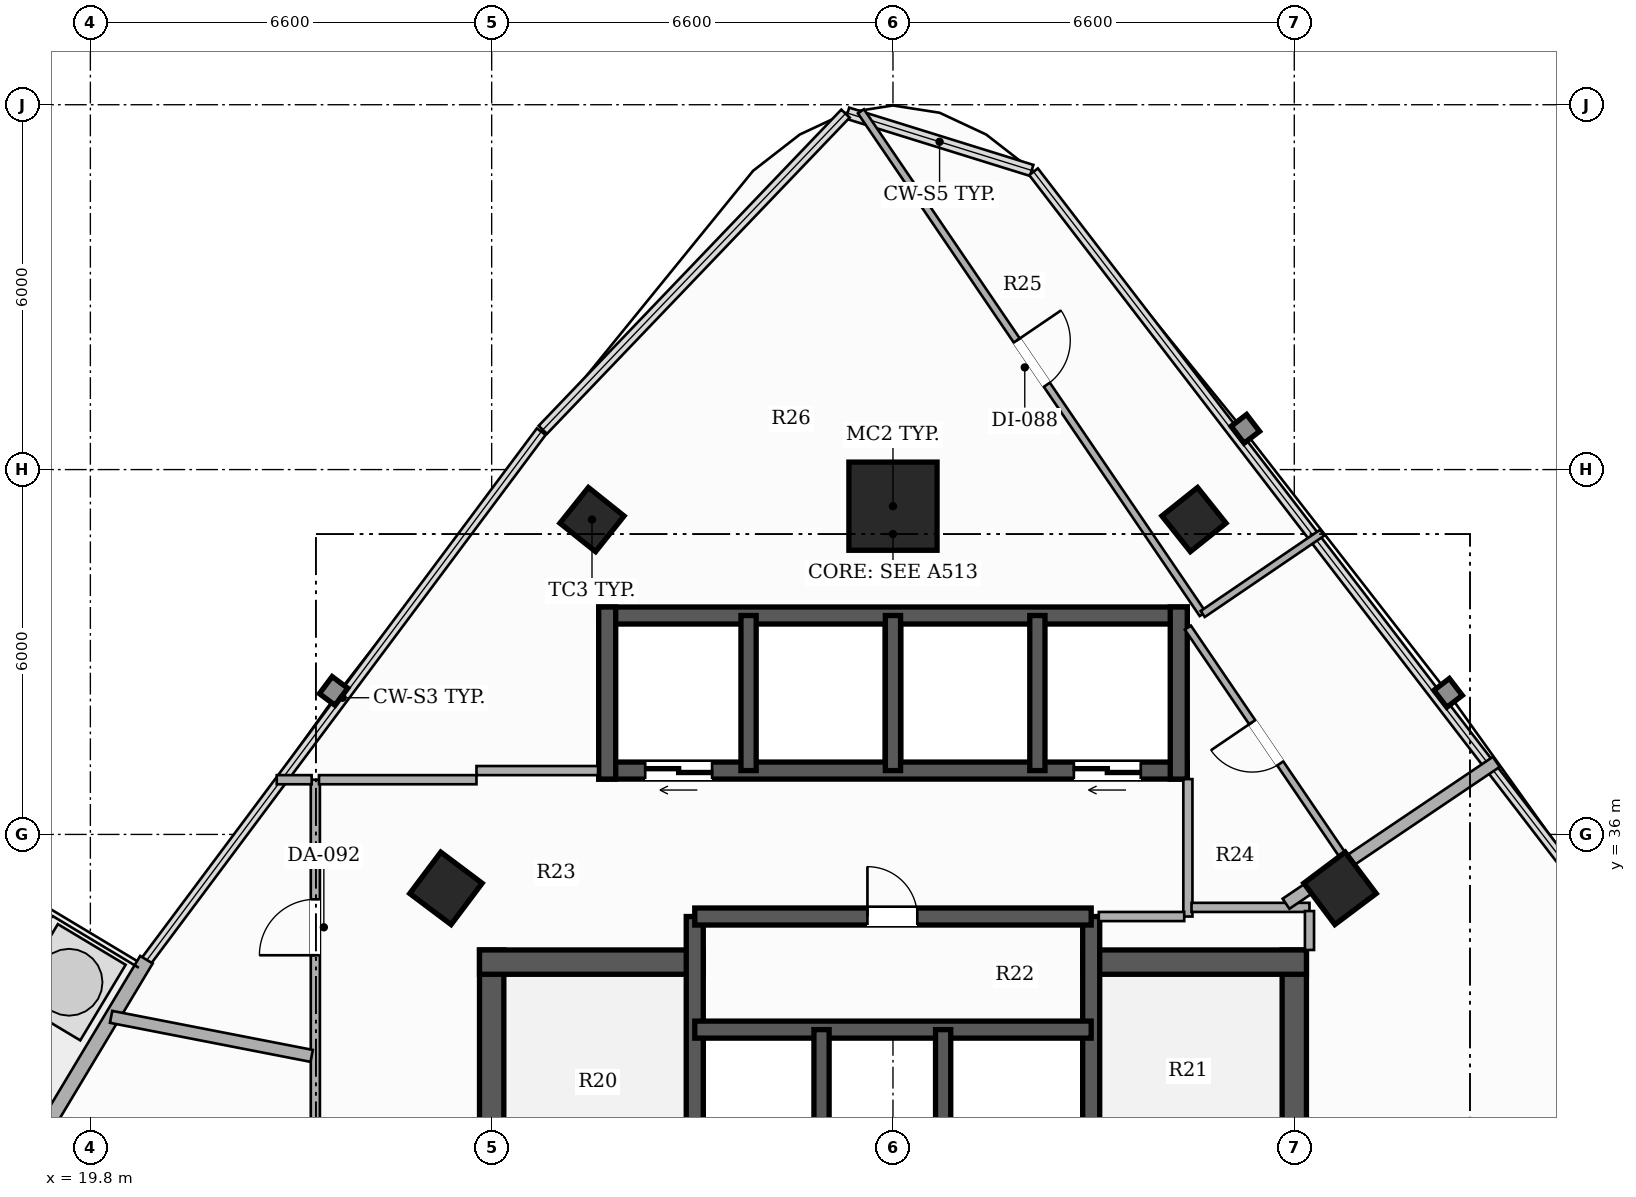
"""IFC4 building model, lengths in metres.
Left out: names, types, materials, properties, quantities, classifications, styles, units other than length and angle.
Written with IfcOpenShell. Run it as: python <this file> out.ifc"""

import sys

from ifc_helpers import new_model, si_unit, direction, frame, frame_2d, origin, origin_2d, place, context, subcontext, project, spatial, rectangle, hollow_rectangle, extrude, element, fill, save


model = new_model("IFC4")
c1 = context("Model", 3, precision=1e-05, world=origin(), true_north=direction((0.0, 1.0)))
c2 = subcontext(c1, "Body", "Model", "MODEL_VIEW")
j1 = project(units=[si_unit("LENGTHUNIT", "METRE"), si_unit("PLANEANGLEUNIT", "RADIAN")], contexts=[c1])
p1 = place(None, origin())
s1 = spatial("IfcSite", under=j1, at=p1, CompositionType="ELEMENT")
p2 = place(p1, origin())
s2 = spatial("IfcBuilding", under=s1, at=p2, CompositionType="ELEMENT")
p3 = place(p2, frame((0.0, 0.0, 163.85)))
s3 = spatial("IfcBuildingStorey", under=s2, at=p3, CompositionType="ELEMENT", Elevation=163.85)
p4 = place(p3, frame((26.4, 26.5, 0.0), z_axis=(0.0, 0.0, 1.0), x_axis=(0.0, 1.0, 0.0)))
e1 = element("IfcWall", 1, at=p4, inside=s3, PredefinedType="SHEAR", context=c2, shape_type="SweptSolid", body=[
    extrude(rectangle(XDim=7.6, YDim=0.4, at=frame_2d((3.8, 0.0))), origin(), (0.0, 0.0, 1.0), 3.3),
])
p5 = place(p3, frame((26.2, 33.9, 0.0), z_axis=(0.0, 0.0, 1.0), x_axis=(1.0, 0.0, 0.0)))
e2 = element("IfcWall", 2, at=p5, inside=s3, PredefinedType="SHEAR", context=c2, shape_type="SweptSolid", body=[
    extrude(rectangle(XDim=3.68, YDim=0.4, at=frame_2d((1.84, 0.0))), origin(), (0.0, 0.0, 1.0), 3.3),
])
p6 = place(p3, frame((39.6, 26.5, 0.0), z_axis=(0.0, 0.0, 1.0), x_axis=(0.0, 1.0, 0.0)))
e3 = element("IfcWall", 3, at=p6, inside=s3, PredefinedType="SHEAR", context=c2, shape_type="SweptSolid", body=[
    extrude(rectangle(XDim=7.6, YDim=0.4, at=frame_2d((3.8, 0.0))), origin(), (0.0, 0.0, 1.0), 3.3),
])
p7 = place(p3, frame((36.12, 33.9, 0.0), z_axis=(0.0, 0.0, 1.0), x_axis=(1.0, 0.0, 0.0)))
e4 = element("IfcWall", 4, at=p7, inside=s3, PredefinedType="SHEAR", context=c2, shape_type="SweptSolid", body=[
    extrude(rectangle(XDim=3.68, YDim=0.4, at=frame_2d((1.84, 0.0))), origin(), (0.0, 0.0, 1.0), 3.3),
])
p8 = place(p3, frame((29.74, 26.5, 0.0), z_axis=(0.0, 0.0, 1.0), x_axis=(0.0, 1.0, 0.0)))
e5 = element("IfcWall", 5, at=p8, inside=s3, PredefinedType="SHEAR", context=c2, shape_type="SweptSolid", body=[
    extrude(rectangle(XDim=8.15, YDim=0.28, at=frame_2d((4.075, 0.0))), origin(), (0.0, 0.0, 1.0), 3.3),
])
p9 = place(p8, frame((0.6, 0.0, 0.0)))
e6 = element("IfcOpeningElement", 6, at=p9, cuts=e5, PredefinedType="OPENING", context=c2, shape_type="SweptSolid", body=[
    extrude(rectangle(XDim=1.05, YDim=2.15, at=frame_2d((0.525, 1.075))), frame((0.0, 0.15, 0.0), z_axis=(0.0, -1.0, 0.0), x_axis=(1.0, 0.0, 0.0)), (0.0, 0.0, 1.0), 0.3),
])
p10 = place(p3, frame((36.26, 26.5, 0.0), z_axis=(0.0, 0.0, 1.0), x_axis=(0.0, 1.0, 0.0)))
e7 = element("IfcWall", 7, at=p10, inside=s3, PredefinedType="SHEAR", context=c2, shape_type="SweptSolid", body=[
    extrude(rectangle(XDim=8.15, YDim=0.28, at=frame_2d((4.075, 0.0))), origin(), (0.0, 0.0, 1.0), 3.3),
])
p11 = place(p10, frame((0.6, 0.0, 0.0)))
e8 = element("IfcOpeningElement", 8, at=p11, cuts=e7, PredefinedType="OPENING", context=c2, shape_type="SweptSolid", body=[
    extrude(rectangle(XDim=1.05, YDim=2.15, at=frame_2d((0.525, 1.075))), frame((0.0, 0.15, 0.0), z_axis=(0.0, -1.0, 0.0), x_axis=(1.0, 0.0, 0.0)), (0.0, 0.0, 1.0), 0.3),
])
p12 = place(p3, frame((29.74, 32.79, 0.0), z_axis=(0.0, 0.0, 1.0), x_axis=(1.0, 0.0, 0.0)))
e9 = element("IfcWall", 9, at=p12, inside=s3, PredefinedType="SHEAR", context=c2, shape_type="SweptSolid", body=[
    extrude(rectangle(XDim=6.52, YDim=0.28, at=frame_2d((3.26, 0.0))), origin(), (0.0, 0.0, 1.0), 3.3),
])
for number, where, z_axis, x_axis in (
    (10, (31.825, 29.89, 0.0), (0.0, 0.0, 1.0), (0.0, 1.0, 0.0)),
    (11, (33.825, 29.89, 0.0), (0.0, 0.0, 1.0), (0.0, 1.0, 0.0)),
):
    element("IfcWall", number, at=place(p3, frame(where, z_axis=z_axis, x_axis=x_axis)), inside=s3, PredefinedType="SHEAR", context=c2, shape_type="SweptSolid", body=[
        extrude(rectangle(XDim=2.9, YDim=0.25, at=frame_2d((1.45, 0.0))), origin(), (0.0, 0.0, 1.0), 3.3),
    ])
p13 = place(p3, frame((29.74, 34.65, 0.0), z_axis=(0.0, 0.0, 1.0), x_axis=(1.0, 0.0, 0.0)))
e12 = element("IfcWall", 12, at=p13, inside=s3, PredefinedType="SHEAR", context=c2, shape_type="SweptSolid", body=[
    extrude(rectangle(XDim=6.52, YDim=0.28, at=frame_2d((3.26, 0.0))), origin(), (0.0, 0.0, 1.0), 3.3),
])
p14 = place(p13, frame((2.84, 0.0, 0.0)))
e13 = element("IfcOpeningElement", 13, at=p14, cuts=e12, PredefinedType="OPENING", context=c2, shape_type="SweptSolid", body=[
    extrude(rectangle(XDim=0.82, YDim=2.1, at=frame_2d((0.41, 1.05))), frame((0.0, 0.15, 0.0), z_axis=(0.0, -1.0, 0.0), x_axis=(1.0, 0.0, 0.0)), (0.0, 0.0, 1.0), 0.3),
])
p15 = place(p3, frame((37.84, 37.05, 0.0), z_axis=(0.0, 0.0, 1.0), x_axis=(-1.0, 0.0, 0.0)))
e14 = element("IfcWall", 14, at=p15, inside=s3, PredefinedType="SHEAR", context=c2, shape_type="SweptSolid", body=[
    extrude(rectangle(XDim=9.68, YDim=0.28, at=frame_2d((4.84, 0.0))), origin(), (0.0, 0.0, 1.0), 3.3),
])
p16 = place(p15, frame((7.815, 0.0, 0.0)))
e15 = element("IfcOpeningElement", 15, at=p16, cuts=e14, PredefinedType="OPENING", context=c2, shape_type="SweptSolid", body=[
    extrude(rectangle(XDim=1.1, YDim=2.2, at=frame_2d((0.55, 1.1))), frame((0.0, 0.15, 0.0), z_axis=(0.0, -1.0, 0.0), x_axis=(1.0, 0.0, 0.0)), (0.0, 0.0, 1.0), 0.3),
])
p17 = place(p15, frame((0.765, 0.0, 0.0)))
e16 = element("IfcOpeningElement", 16, at=p17, cuts=e14, PredefinedType="OPENING", context=c2, shape_type="SweptSolid", body=[
    extrude(rectangle(XDim=1.1, YDim=2.2, at=frame_2d((0.55, 1.1))), frame((0.0, 0.15, 0.0), z_axis=(0.0, -1.0, 0.0), x_axis=(1.0, 0.0, 0.0)), (0.0, 0.0, 1.0), 0.3),
])
p18 = place(p3, frame((28.16, 39.6, 0.0), z_axis=(0.0, 0.0, 1.0), x_axis=(1.0, 0.0, 0.0)))
e17 = element("IfcWall", 17, at=p18, inside=s3, PredefinedType="SHEAR", context=c2, shape_type="SweptSolid", body=[
    extrude(rectangle(XDim=9.68, YDim=0.28, at=frame_2d((4.84, 0.0))), origin(), (0.0, 0.0, 1.0), 3.3),
])
for number, where, z_axis, x_axis in (
    (18, (28.3, 36.91, 0.0), (0.0, 0.0, 1.0), (0.0, 1.0, 0.0)),
    (19, (37.7, 36.91, 0.0), (0.0, 0.0, 1.0), (0.0, 1.0, 0.0)),
):
    element("IfcWall", number, at=place(p3, frame(where, z_axis=z_axis, x_axis=x_axis)), inside=s3, PredefinedType="SHEAR", context=c2, shape_type="SweptSolid", body=[
        extrude(rectangle(XDim=2.83, YDim=0.28, at=frame_2d((1.415, 0.0))), origin(), (0.0, 0.0, 1.0), 3.3),
    ])
for number, where, z_axis, x_axis in (
    (20, (30.625, 37.05, 0.0), (0.0, 0.0, 1.0), (0.0, 1.0, 0.0)),
    (21, (33.0, 37.05, 0.0), (0.0, 0.0, 1.0), (0.0, 1.0, 0.0)),
    (22, (35.375, 37.05, 0.0), (0.0, 0.0, 1.0), (0.0, 1.0, 0.0)),
):
    element("IfcWall", number, at=place(p3, frame(where, z_axis=z_axis, x_axis=x_axis)), inside=s3, PredefinedType="SHEAR", context=c2, shape_type="SweptSolid", body=[
        extrude(rectangle(XDim=2.55, YDim=0.25, at=frame_2d((1.275, 0.0))), origin(), (0.0, 0.0, 1.0), 3.3),
    ])
p19 = place(p3, frame((33.0, 41.398, 0.0), z_axis=(0.0, 0.0, 1.0), x_axis=(1.0, 0.0, 0.0)))
e23 = element("IfcColumn", 23, at=p19, inside=s3, PredefinedType="COLUMN", context=c2, shape_type="SweptSolid", body=[
    extrude(hollow_rectangle(XDim=1.45, YDim=1.45, WallThickness=0.045, at=origin_2d()), origin(), (0.0, 0.0, 1.0), 3.3),
])
for number, where, z_axis, x_axis in (
    (24, (25.648, 35.113, 0.0), (0.0, 0.0, 1.0), (0.6, 0.8, 0.0)),
    (25, (40.352, 35.113, 0.0), (0.0, 0.0, 1.0), (-0.6, 0.8, 0.0)),
):
    element("IfcColumn", number, at=place(p3, frame(where, z_axis=z_axis, x_axis=x_axis)), inside=s3, PredefinedType="COLUMN", context=c2, shape_type="SweptSolid", body=[
        extrude(hollow_rectangle(XDim=0.85, YDim=0.85, WallThickness=0.028, at=origin_2d()), origin(), (0.0, 0.0, 1.0), 3.3),
    ])
for number, where, z_axis, x_axis in (
    (26, (28.05, 41.178, 0.0), (0.0, 0.0, 1.0), (0.624, 0.782, 0.0)),
    (27, (37.95, 41.178, 0.0), (0.0, 0.0, 1.0), (-0.624, 0.782, 0.0)),
):
    element("IfcColumn", number, at=place(p3, frame(where, z_axis=z_axis, x_axis=x_axis)), inside=s3, PredefinedType="COLUMN", context=c2, shape_type="SweptSolid", body=[
        extrude(hollow_rectangle(XDim=0.75, YDim=0.75, WallThickness=0.025, at=origin_2d()), origin(), (0.0, 0.0, 1.0), 3.3),
    ])
p20 = place(p3, frame((20.722, 33.94, 0.0), z_axis=(0.0, 0.0, 1.0), x_axis=(-0.514334017412, -0.85758994778, 0.0)))
e28 = element("IfcWall", 28, at=p20, inside=s3, PredefinedType="SOLIDWALL", context=c2, shape_type="SweptSolid", body=[
    extrude(rectangle(XDim=11.1, YDim=0.24, at=frame_2d((5.55, 0.0))), origin(), (0.0, 0.0, 1.0), 2.624),
])
p21 = place(p20, frame((8.602, 0.0, 0.0)))
e29 = element("IfcOpeningElement", 29, at=p21, cuts=e28, PredefinedType="OPENING", context=c2, shape_type="SweptSolid", body=[
    extrude(rectangle(XDim=1.8, YDim=2.2, at=frame_2d((0.9, 1.1))), frame((0.0, 0.13, 0.0), z_axis=(0.0, -1.0, 0.0), x_axis=(1.0, 0.0, 0.0)), (0.0, 0.0, 1.0), 0.26),
])
p22 = place(p3, frame((37.85, 34.65, 0.0), z_axis=(0.0, 0.0, 1.0), x_axis=(0.0, 1.0, 0.0)))
e30 = element("IfcWall", 30, at=p22, inside=s3, PredefinedType="PARTITIONING", context=c2, shape_type="SweptSolid", body=[
    extrude(rectangle(XDim=2.26, YDim=0.15, at=frame_2d((1.13, 0.0))), origin(), (0.0, 0.0, 1.0), 3.06),
])
p23 = place(p3, frame((36.385, 34.65, 0.0), z_axis=(0.0, 0.0, 1.0), x_axis=(1.0, 0.0, 0.0)))
e31 = element("IfcWall", 31, at=p23, inside=s3, PredefinedType="PARTITIONING", context=c2, shape_type="SweptSolid", body=[
    extrude(rectangle(XDim=1.405, YDim=0.15, at=frame_2d((0.703, 0.0))), origin(), (0.0, 0.0, 1.0), 2.425),
])
p24 = place(p3, frame((23.5, 14.06, 0.0), z_axis=(0.0, 0.0, 1.0), x_axis=(0.0, 1.0, 0.0)))
e32 = element("IfcWall", 32, at=p24, inside=s3, PredefinedType="PARTITIONING", context=c2, shape_type="SweptSolid", body=[
    extrude(rectangle(XDim=22.84, YDim=0.15, at=frame_2d((11.42, 0.0))), origin(), (0.0, 0.0, 1.0), 2.413),
])
p25 = place(p24, frame((4.064, 0.0, 0.0)))
e33 = element("IfcOpeningElement", 33, at=p25, cuts=e32, PredefinedType="OPENING", context=c2, shape_type="SweptSolid", body=[
    extrude(rectangle(XDim=0.92, YDim=2.15, at=frame_2d((0.46, 1.075))), frame((0.0, 0.085, 0.0), z_axis=(0.0, -1.0, 0.0), x_axis=(1.0, 0.0, 0.0)), (0.0, 0.0, 1.0), 0.17),
])
p26 = place(p24, frame((13.047, 0.0, 0.0)))
e34 = element("IfcOpeningElement", 34, at=p26, cuts=e32, PredefinedType="OPENING", context=c2, shape_type="SweptSolid", body=[
    extrude(rectangle(XDim=0.88, YDim=2.1, at=frame_2d((0.44, 1.05))), frame((0.0, 0.085, 0.0), z_axis=(0.0, -1.0, 0.0), x_axis=(1.0, 0.0, 0.0)), (0.0, 0.0, 1.0), 0.17),
])
p27 = place(p24, frame((19.953, 0.0, 0.0)))
e35 = element("IfcOpeningElement", 35, at=p27, cuts=e32, PredefinedType="OPENING", context=c2, shape_type="SweptSolid", body=[
    extrude(rectangle(XDim=0.92, YDim=2.15, at=frame_2d((0.46, 1.075))), frame((0.0, 0.085, 0.0), z_axis=(0.0, -1.0, 0.0), x_axis=(1.0, 0.0, 0.0)), (0.0, 0.0, 1.0), 0.17),
])
p28 = place(p3, frame((22.865, 36.9, 0.0), z_axis=(0.0, 0.0, 1.0), x_axis=(1.0, 0.0, 0.0)))
e36 = element("IfcWall", 36, at=p28, inside=s3, PredefinedType="PARTITIONING", context=c2, shape_type="SweptSolid", body=[
    extrude(rectangle(XDim=0.575, YDim=0.15, at=frame_2d((0.288, 0.0))), origin(), (0.0, 0.0, 1.0), 3.06),
])
p29 = place(p3, frame((23.56, 36.9, 0.0), z_axis=(0.0, 0.0, 1.0), x_axis=(1.0, 0.0, 0.0)))
e37 = element("IfcWall", 37, at=p29, inside=s3, PredefinedType="PARTITIONING", context=c2, shape_type="SweptSolid", body=[
    extrude(rectangle(XDim=2.59, YDim=0.15, at=frame_2d((1.295, 0.0))), origin(), (0.0, 0.0, 1.0), 2.413),
])
p30 = place(p3, frame((26.15, 37.05, 0.0), z_axis=(0.0, 0.0, 1.0), x_axis=(1.0, 0.0, 0.0)))
e38 = element("IfcWall", 38, at=p30, inside=s3, PredefinedType="PARTITIONING", context=c2, shape_type="SweptSolid", body=[
    extrude(rectangle(XDim=2.0, YDim=0.15, at=frame_2d((1.0, 0.0))), origin(), (0.0, 0.0, 1.0), 2.413),
])
p31 = place(p3, frame((37.91, 34.8, 0.0), z_axis=(0.0, 0.0, 1.0), x_axis=(1.0, 0.0, 0.0)))
e39 = element("IfcWall", 39, at=p31, inside=s3, PredefinedType="PARTITIONING", context=c2, shape_type="SweptSolid", body=[
    extrude(rectangle(XDim=1.94, YDim=0.15, at=frame_2d((0.97, 0.0))), origin(), (0.0, 0.0, 1.0), 2.721),
])
p32 = place(p3, frame((39.85, 34.74, 0.0), z_axis=(0.0, 0.0, 1.0), x_axis=(0.0, -1.0, 0.0)))
e40 = element("IfcWall", 40, at=p32, inside=s3, PredefinedType="PARTITIONING", context=c2, shape_type="SweptSolid", body=[
    extrude(rectangle(XDim=0.64, YDim=0.15, at=frame_2d((0.32, 0.0))), origin(), (0.0, 0.0, 1.0), 2.721),
])
p33 = place(p3, frame((39.464, 34.86, 0.0), z_axis=(0.0, 0.0, 1.0), x_axis=(0.828976210701, 0.559283865395, 0.0)))
e41 = element("IfcWall", 41, at=p33, inside=s3, PredefinedType="PARTITIONING", context=c2, shape_type="SweptSolid", body=[
    extrude(rectangle(XDim=4.171, YDim=0.2, at=frame_2d((2.086, 0.0))), origin(), (0.0, 0.0, 1.0), 2.413),
])
p34 = place(p3, frame((20.141, 33.0, 0.0), z_axis=(0.0, 0.0, 1.0), x_axis=(0.981579076432, -0.191056318163, 0.0)))
e42 = element("IfcWall", 42, at=p34, inside=s3, PredefinedType="PARTITIONING", context=c2, shape_type="SweptSolid", body=[
    extrude(rectangle(XDim=3.361, YDim=0.2, at=frame_2d((1.68, 0.0))), origin(), (0.0, 0.0, 1.0), 2.413),
])
p35 = place(p3, frame((40.427, 35.612, 0.0), z_axis=(0.0, 0.0, 1.0), x_axis=(-0.562385802303, 0.826874965982, 0.0)))
e43 = element("IfcWall", 43, at=p35, inside=s3, PredefinedType="PARTITIONING", context=c2, shape_type="SweptSolid", body=[
    extrude(rectangle(XDim=4.582, YDim=0.12, at=frame_2d((2.291, 0.0))), origin(), (0.0, 0.0, 1.0), 2.413),
])
p36 = place(p35, frame((1.881, 0.0, 0.0)))
e44 = element("IfcOpeningElement", 44, at=p36, cuts=e43, PredefinedType="OPENING", context=c2, shape_type="SweptSolid", body=[
    extrude(rectangle(XDim=0.82, YDim=2.1, at=frame_2d((0.41, 1.05))), frame((0.0, 0.07, 0.0), z_axis=(0.0, -1.0, 0.0), x_axis=(1.0, 0.0, 0.0)), (0.0, 0.0, 1.0), 0.14),
])
p37 = place(p3, frame((32.473, 47.892, 0.0), z_axis=(0.0, 0.0, 1.0), x_axis=(0.562273950157, -0.826951029369, 0.0)))
e45 = element("IfcWall", 45, at=p37, inside=s3, PredefinedType="PARTITIONING", context=c2, shape_type="SweptSolid", body=[
    extrude(rectangle(XDim=9.997, YDim=0.12, at=frame_2d((4.999, 0.0))), origin(), (0.0, 0.0, 1.0), 2.413),
])
p38 = place(p37, frame((4.558, 0.0, 0.0)))
e46 = element("IfcOpeningElement", 46, at=p38, cuts=e45, PredefinedType="OPENING", context=c2, shape_type="SweptSolid", body=[
    extrude(rectangle(XDim=0.88, YDim=2.1, at=frame_2d((0.44, 1.05))), frame((0.0, 0.07, 0.0), z_axis=(0.0, -1.0, 0.0), x_axis=(1.0, 0.0, 0.0)), (0.0, 0.0, 1.0), 0.14),
])
p39 = place(p3, frame((38.094, 39.625, 0.0), z_axis=(0.0, 0.0, 1.0), x_axis=(0.826798473187, 0.562498253096, 0.0)))
e47 = element("IfcWall", 47, at=p39, inside=s3, PredefinedType="PARTITIONING", context=c2, shape_type="SweptSolid", body=[
    extrude(rectangle(XDim=2.377, YDim=0.12, at=frame_2d((1.188, 0.0))), origin(), (0.0, 0.0, 1.0), 2.413),
])
p40 = place(p16, origin())
e48 = element("IfcDoor", 48, at=p40, inside=s3, OperationType="DOUBLE_DOOR_SLIDING", PredefinedType="DOOR", context=c2, shape_type="SweptSolid", body=[
    extrude(rectangle(XDim=1.1, YDim=2.2, at=frame_2d((0.55, 1.1))), frame((0.0, 0.025, 0.0), z_axis=(0.0, -1.0, 0.0), x_axis=(1.0, 0.0, 0.0)), (0.0, 0.0, 1.0), 0.05),
])
fill(e15, e48)
p41 = place(p17, origin())
e49 = element("IfcDoor", 49, at=p41, inside=s3, OperationType="DOUBLE_DOOR_SLIDING", PredefinedType="DOOR", context=c2, shape_type="SweptSolid", body=[
    extrude(rectangle(XDim=1.1, YDim=2.2, at=frame_2d((0.55, 1.1))), frame((0.0, 0.025, 0.0), z_axis=(0.0, -1.0, 0.0), x_axis=(1.0, 0.0, 0.0)), (0.0, 0.0, 1.0), 0.05),
])
fill(e16, e49)
p42 = place(p14, origin())
e50 = element("IfcDoor", 50, at=p42, inside=s3, OperationType="SINGLE_SWING_LEFT", PredefinedType="DOOR", context=c2, shape_type="SweptSolid", body=[
    extrude(rectangle(XDim=0.82, YDim=2.1, at=frame_2d((0.41, 1.05))), frame((0.0, 0.025, 0.0), z_axis=(0.0, -1.0, 0.0), x_axis=(1.0, 0.0, 0.0)), (0.0, 0.0, 1.0), 0.05),
])
fill(e13, e50)
p43 = place(p27, origin())
e51 = element("IfcDoor", 51, at=p43, inside=s3, OperationType="SINGLE_SWING_LEFT", PredefinedType="DOOR", context=c2, shape_type="SweptSolid", body=[
    extrude(rectangle(XDim=0.92, YDim=2.15, at=frame_2d((0.46, 1.075))), frame((0.0, 0.025, 0.0), z_axis=(0.0, -1.0, 0.0), x_axis=(1.0, 0.0, 0.0)), (0.0, 0.0, 1.0), 0.05),
])
fill(e35, e51)
p44 = place(p36, origin())
e52 = element("IfcDoor", 52, at=p44, inside=s3, OperationType="SINGLE_SWING_RIGHT", PredefinedType="DOOR", context=c2, shape_type="SweptSolid", body=[
    extrude(rectangle(XDim=0.82, YDim=2.1, at=frame_2d((0.41, 1.05))), frame((0.0, 0.025, 0.0), z_axis=(0.0, -1.0, 0.0), x_axis=(1.0, 0.0, 0.0)), (0.0, 0.0, 1.0), 0.05),
])
fill(e44, e52)
p45 = place(p38, origin())
e53 = element("IfcDoor", 53, at=p45, inside=s3, OperationType="SINGLE_SWING_LEFT", PredefinedType="DOOR", context=c2, shape_type="SweptSolid", body=[
    extrude(rectangle(XDim=0.88, YDim=2.1, at=frame_2d((0.44, 1.05))), frame((0.0, 0.025, 0.0), z_axis=(0.0, -1.0, 0.0), x_axis=(1.0, 0.0, 0.0)), (0.0, 0.0, 1.0), 0.05),
])
fill(e46, e53)
save(model, sys.argv[1])
